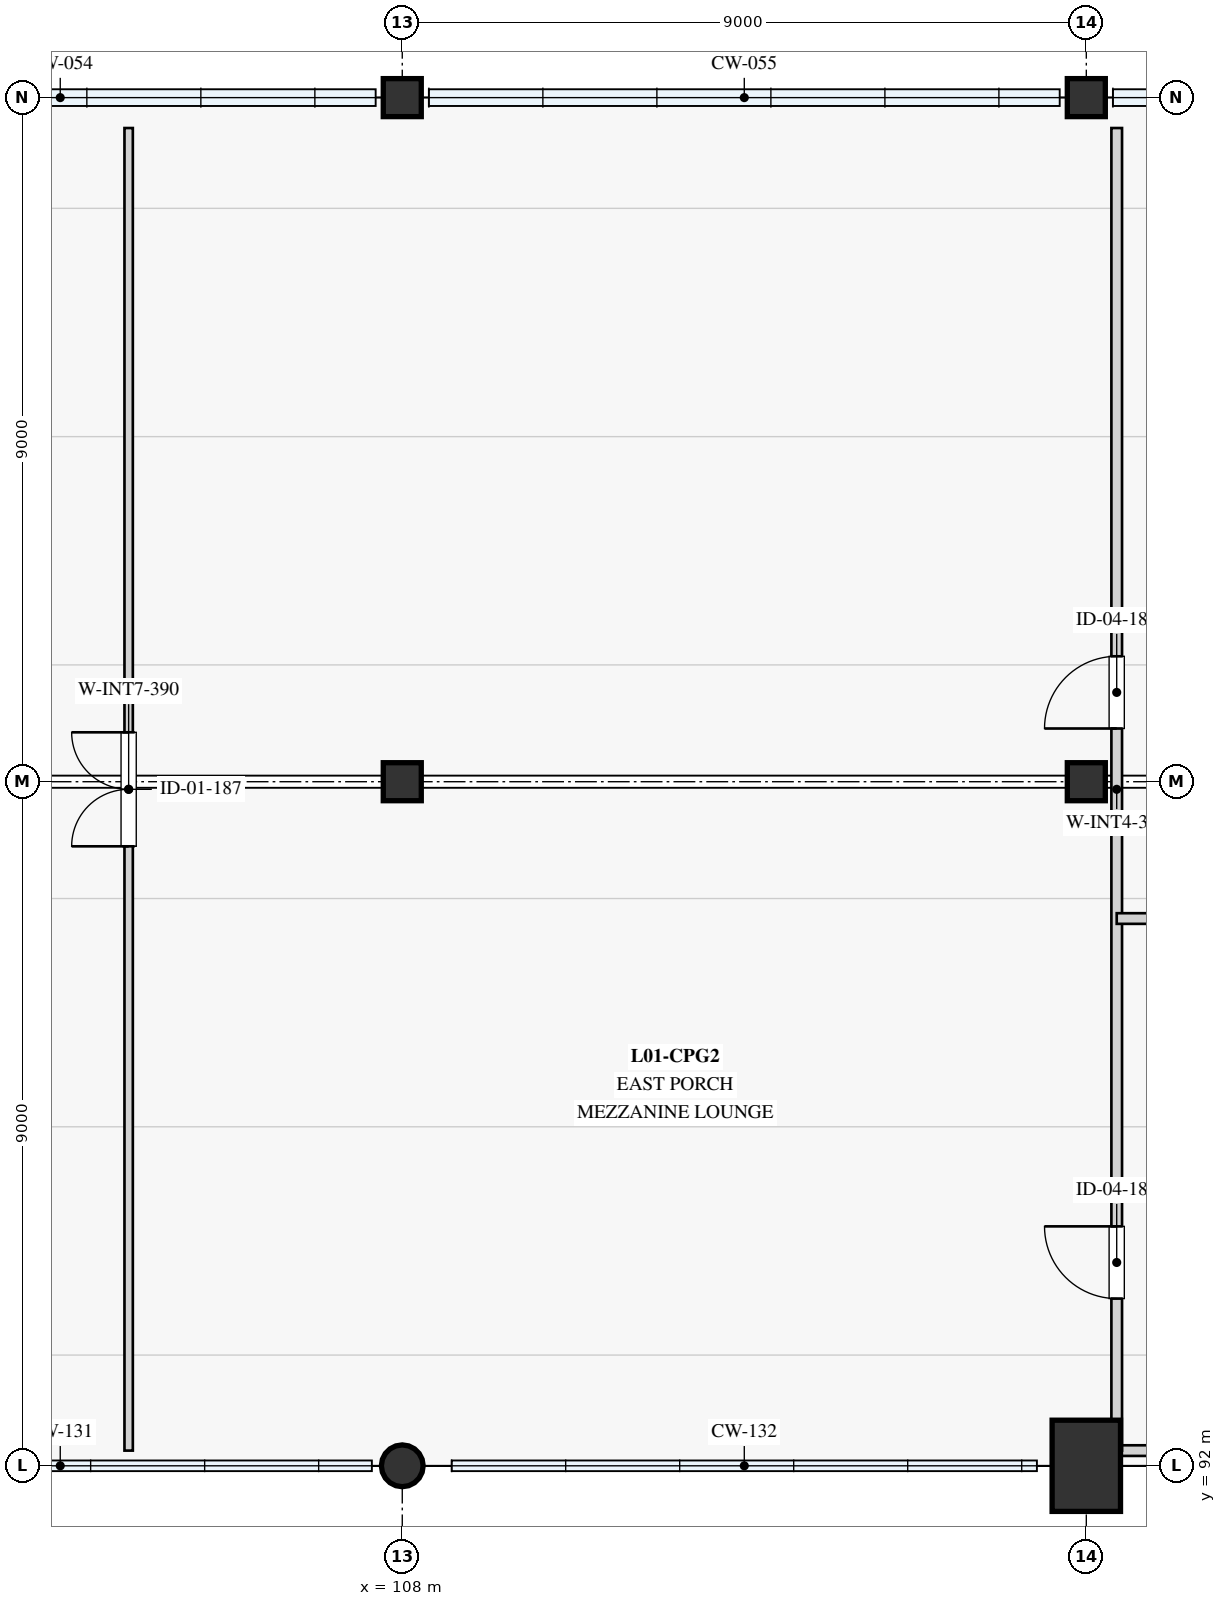
"""IFC4 building model, lengths in metres.
Left out: names, types, materials, properties, quantities, classifications, styles, units other than length and angle.
Written with IfcOpenShell. Run it as: python <this file> out.ifc"""

import sys

from ifc_helpers import new_model, si_unit, direction, frame, frame_2d, origin, origin_2d, place, context, subcontext, project, spatial, rectangle, circle, extrude, element, fill, save


model = new_model("IFC4")
c1 = context("Model", 3, precision=1e-05, world=origin(), true_north=direction((0.0, 1.0)))
c2 = subcontext(c1, "Body", "Model", "MODEL_VIEW")
j1 = project(units=[si_unit("LENGTHUNIT", "METRE"), si_unit("PLANEANGLEUNIT", "RADIAN")], contexts=[c1])
p1 = place(None, origin())
s1 = spatial("IfcSite", under=j1, at=p1, CompositionType="ELEMENT")
p2 = place(p1, origin())
s2 = spatial("IfcBuilding", under=s1, at=p2, CompositionType="ELEMENT")
p3 = place(p2, frame((0.0, 0.0, 4.5)))
s3 = spatial("IfcBuildingStorey", under=s2, at=p3, CompositionType="ELEMENT", Elevation=4.5)
p4 = place(p3, frame((108.0, 92.0, 0.0), z_axis=(0.0, 0.0, 1.0), x_axis=(1.0, 0.0, 0.0)))
e1 = element("IfcColumn", 1, at=p4, inside=s3, PredefinedType="COLUMN", context=c2, shape_type="SweptSolid", body=[
    extrude(circle(Radius=0.275, at=origin_2d()), origin(), (0.0, 0.0, 1.0), 3.9),
])
p5 = place(p3, frame((108.0, 101.0, 0.0), z_axis=(0.0, 0.0, 1.0), x_axis=(1.0, 0.0, 0.0)))
e2 = element("IfcColumn", 2, at=p5, inside=s3, PredefinedType="COLUMN", context=c2, shape_type="SweptSolid", body=[
    extrude(rectangle(XDim=0.5, YDim=0.5, at=origin_2d()), origin(), (0.0, 0.0, 1.0), 5.71),
])
p6 = place(p3, frame((108.0, 110.0, 0.0), z_axis=(0.0, 0.0, 1.0), x_axis=(1.0, 0.0, 0.0)))
e3 = element("IfcColumn", 3, at=p6, inside=s3, PredefinedType="COLUMN", context=c2, shape_type="SweptSolid", body=[
    extrude(rectangle(XDim=0.5, YDim=0.5, at=origin_2d()), origin(), (0.0, 0.0, 1.0), 3.71),
])
p7 = place(p3, frame((117.0, 92.0, 0.0), z_axis=(0.0, 0.0, 1.0), x_axis=(1.0, 0.0, 0.0)))
e4 = element("IfcColumn", 4, at=p7, inside=s3, PredefinedType="COLUMN", context=c2, shape_type="SweptSolid", body=[
    extrude(rectangle(XDim=0.9, YDim=1.2, at=origin_2d()), origin(), (0.0, 0.0, 1.0), 3.9),
])
p8 = place(p3, frame((117.0, 101.0, 0.0), z_axis=(0.0, 0.0, 1.0), x_axis=(1.0, 0.0, 0.0)))
e5 = element("IfcColumn", 5, at=p8, inside=s3, PredefinedType="COLUMN", context=c2, shape_type="SweptSolid", body=[
    extrude(rectangle(XDim=0.5, YDim=0.5, at=origin_2d()), origin(), (0.0, 0.0, 1.0), 5.71),
])
p9 = place(p3, frame((117.0, 110.0, 0.0), z_axis=(0.0, 0.0, 1.0), x_axis=(1.0, 0.0, 0.0)))
e6 = element("IfcColumn", 6, at=p9, inside=s3, PredefinedType="COLUMN", context=c2, shape_type="SweptSolid", body=[
    extrude(rectangle(XDim=0.5, YDim=0.5, at=origin_2d()), origin(), (0.0, 0.0, 1.0), 3.71),
])
p10 = place(p3, frame((117.4, 92.2, 0.0), z_axis=(0.0, 0.0, 1.0), x_axis=(1.0, 0.0, 0.0)))
e7 = element("IfcWall", 7, at=p10, inside=s3, PredefinedType="PARTITIONING", context=c2, shape_type="SweptSolid", body=[
    extrude(rectangle(XDim=7.45, YDim=0.14, at=frame_2d((3.725, 0.0))), origin(), (0.0, 0.0, 1.0), 2.65),
])
p11 = place(p10, frame((1.8, 0.0, 0.0)))
e8 = element("IfcOpeningElement", 8, at=p11, cuts=e7, PredefinedType="OPENING", context=c2, shape_type="SweptSolid", body=[
    extrude(rectangle(XDim=0.95, YDim=2.1, at=frame_2d((0.475, 1.05))), frame((0.0, 0.08, 0.0), z_axis=(0.0, -1.0, 0.0), x_axis=(1.0, 0.0, 0.0)), (0.0, 0.0, 1.0), 0.16),
])
p12 = place(p10, frame((4.65, 0.0, 0.0)))
e9 = element("IfcOpeningElement", 9, at=p12, cuts=e7, PredefinedType="OPENING", context=c2, shape_type="SweptSolid", body=[
    extrude(rectangle(XDim=0.95, YDim=2.1, at=frame_2d((0.475, 1.05))), frame((0.0, 0.08, 0.0), z_axis=(0.0, -1.0, 0.0), x_axis=(1.0, 0.0, 0.0)), (0.0, 0.0, 1.0), 0.16),
])
p13 = place(p3, frame((117.4, 92.2, 0.0), z_axis=(0.0, 0.0, 1.0), x_axis=(0.0, 1.0, 0.0)))
e10 = element("IfcWall", 10, at=p13, inside=s3, PredefinedType="PARTITIONING", context=c2, shape_type="SweptSolid", body=[
    extrude(rectangle(XDim=17.4, YDim=0.14, at=frame_2d((8.7, 0.0))), origin(), (0.0, 0.0, 1.0), 2.65),
])
p14 = place(p13, frame((2.0, 0.0, 0.0)))
e11 = element("IfcOpeningElement", 11, at=p14, cuts=e10, PredefinedType="OPENING", context=c2, shape_type="SweptSolid", body=[
    extrude(rectangle(XDim=0.95, YDim=2.1, at=frame_2d((0.475, 1.05))), frame((0.0, 0.08, 0.0), z_axis=(0.0, -1.0, 0.0), x_axis=(1.0, 0.0, 0.0)), (0.0, 0.0, 1.0), 0.16),
])
p15 = place(p13, frame((9.5, 0.0, 0.0)))
e12 = element("IfcOpeningElement", 12, at=p15, cuts=e10, PredefinedType="OPENING", context=c2, shape_type="SweptSolid", body=[
    extrude(rectangle(XDim=0.95, YDim=2.1, at=frame_2d((0.475, 1.05))), frame((0.0, 0.08, 0.0), z_axis=(0.0, -1.0, 0.0), x_axis=(1.0, 0.0, 0.0)), (0.0, 0.0, 1.0), 0.16),
])
p16 = place(p3, frame((117.4, 99.2, 0.0), z_axis=(0.0, 0.0, 1.0), x_axis=(1.0, 0.0, 0.0)))
e13 = element("IfcWall", 13, at=p16, inside=s3, PredefinedType="PARTITIONING", context=c2, shape_type="SweptSolid", body=[
    extrude(rectangle(XDim=7.45, YDim=0.14, at=frame_2d((3.725, 0.0))), origin(), (0.0, 0.0, 1.0), 2.65),
])
p17 = place(p3, frame((104.4, 92.2, 0.0), z_axis=(0.0, 0.0, 1.0), x_axis=(0.0, 1.0, 0.0)))
e14 = element("IfcWall", 14, at=p17, inside=s3, PredefinedType="PARTITIONING", context=c2, shape_type="SweptSolid", body=[
    extrude(rectangle(XDim=17.4, YDim=0.11, at=frame_2d((8.7, 0.0))), origin(), (0.0, 0.0, 1.0), 2.65),
])
p18 = place(p17, frame((7.95, 0.0, 0.0)))
e15 = element("IfcOpeningElement", 15, at=p18, cuts=e14, PredefinedType="OPENING", context=c2, shape_type="SweptSolid", body=[
    extrude(rectangle(XDim=1.5, YDim=2.25, at=frame_2d((0.75, 1.125))), frame((0.0, 0.065, 0.0), z_axis=(0.0, -1.0, 0.0), x_axis=(1.0, 0.0, 0.0)), (0.0, 0.0, 1.0), 0.13),
])
p19 = place(p14, origin())
e16 = element("IfcDoor", 16, at=p19, inside=s3, OperationType="SINGLE_SWING_RIGHT", PredefinedType="DOOR", context=c2, shape_type="SweptSolid", body=[
    extrude(rectangle(XDim=0.95, YDim=2.1, at=frame_2d((0.475, 1.05))), frame((0.0, 0.025, 0.0), z_axis=(0.0, -1.0, 0.0), x_axis=(1.0, 0.0, 0.0)), (0.0, 0.0, 1.0), 0.05),
])
fill(e11, e16)
p20 = place(p15, origin())
e17 = element("IfcDoor", 17, at=p20, inside=s3, OperationType="SINGLE_SWING_LEFT", PredefinedType="DOOR", context=c2, shape_type="SweptSolid", body=[
    extrude(rectangle(XDim=0.95, YDim=2.1, at=frame_2d((0.475, 1.05))), frame((0.0, 0.025, 0.0), z_axis=(0.0, -1.0, 0.0), x_axis=(1.0, 0.0, 0.0)), (0.0, 0.0, 1.0), 0.05),
])
fill(e12, e17)
p21 = place(p18, origin())
e18 = element("IfcDoor", 18, at=p21, inside=s3, OperationType="DOUBLE_DOOR_SINGLE_SWING", PredefinedType="DOOR", context=c2, shape_type="SweptSolid", body=[
    extrude(rectangle(XDim=1.5, YDim=2.25, at=frame_2d((0.75, 1.125))), frame((0.0, 0.025, 0.0), z_axis=(0.0, -1.0, 0.0), x_axis=(1.0, 0.0, 0.0)), (0.0, 0.0, 1.0), 0.05),
])
fill(e15, e18)
save(model, sys.argv[1])
